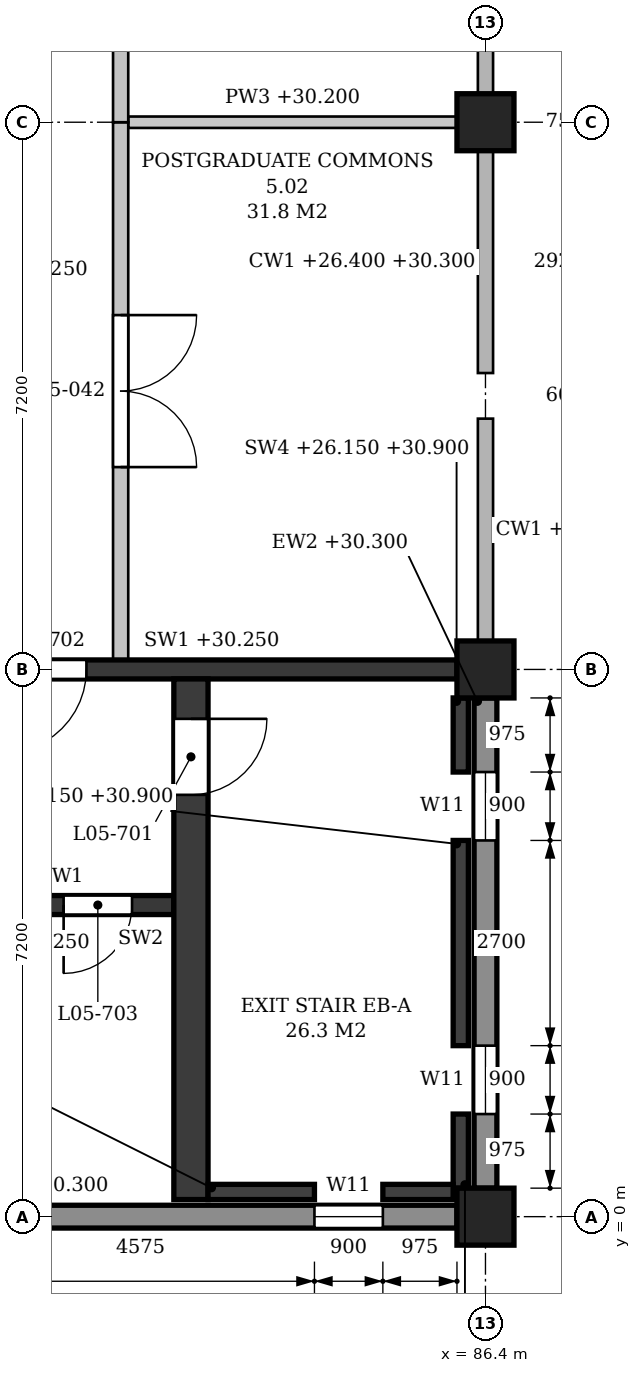
"""IFC4 building model, lengths in metres.
Left out: names, types, materials, properties, quantities, classifications, styles, units other than length and angle.
Written with IfcOpenShell. Run it as: python <this file> out.ifc"""

import sys

from ifc_helpers import new_model, si_unit, direction, frame, frame_2d, origin, origin_2d, place, context, subcontext, project, spatial, polyline, rectangle, outline, extrude, element, fill, save


model = new_model("IFC4")
c1 = context("Model", 3, precision=1e-05, world=origin(), true_north=direction((0.0, 1.0)))
c2 = subcontext(c1, "Body", "Model", "MODEL_VIEW")
j1 = project(units=[si_unit("LENGTHUNIT", "METRE"), si_unit("PLANEANGLEUNIT", "RADIAN")], contexts=[c1])
p1 = place(None, origin())
s1 = spatial("IfcSite", under=j1, at=p1, CompositionType="ELEMENT")
p2 = place(p1, origin())
s2 = spatial("IfcBuilding", under=s1, at=p2, CompositionType="ELEMENT")
p3 = place(p2, frame((0.0, 0.0, 26.4)))
s3 = spatial("IfcBuildingStorey", under=s2, at=p3, CompositionType="ELEMENT", Elevation=26.4)
for number, where, z_axis, x_axis in (
    (1, (86.4, 0.0, 0.0), (0.0, 0.0, 1.0), (1.0, 0.0, 0.0)),
    (2, (86.4, 7.2, 0.0), (0.0, 0.0, 1.0), (1.0, 0.0, 0.0)),
    (3, (86.4, 14.4, 0.0), (0.0, 0.0, 1.0), (1.0, 0.0, 0.0)),
):
    element("IfcColumn", number, at=place(p3, frame(where, z_axis=z_axis, x_axis=x_axis)), inside=s3, PredefinedType="COLUMN", context=c2, shape_type="SweptSolid", body=[
        extrude(rectangle(XDim=0.75, YDim=0.75, at=origin_2d()), origin(), (0.0, 0.0, 1.0), 4.8),
    ])
p4 = place(p3, frame((79.575, 0.0, 0.0), z_axis=(0.0, 0.0, 1.0), x_axis=(1.0, 0.0, 0.0)))
e4 = element("IfcWall", 4, at=p4, inside=s3, PredefinedType="STANDARD", context=c2, shape_type="SweptSolid", body=[
    extrude(rectangle(XDim=6.45, YDim=0.3, at=frame_2d((3.225, 0.0))), origin(), (0.0, 0.0, 1.0), 3.9),
])
p5 = place(p4, frame((4.575, 0.0, 0.9)))
e5 = element("IfcOpeningElement", 5, at=p5, cuts=e4, PredefinedType="OPENING", context=c2, shape_type="SweptSolid", body=[
    extrude(outline(polyline([(0.0, 0.0), (0.9, 0.0), (0.9, 2.05), (0.45, 2.5), (0.0, 2.05), (0.0, 0.0)])), frame((0.0, 0.16, 0.0), z_axis=(0.0, -1.0, 0.0), x_axis=(1.0, 0.0, 0.0)), (0.0, 0.0, 1.0), 0.32),
])
p6 = place(p3, frame((86.4, 0.375, 0.0), z_axis=(0.0, 0.0, 1.0), x_axis=(0.0, 1.0, 0.0)))
e6 = element("IfcWall", 6, at=p6, inside=s3, PredefinedType="STANDARD", context=c2, shape_type="SweptSolid", body=[
    extrude(rectangle(XDim=6.45, YDim=0.3, at=frame_2d((3.225, 0.0))), origin(), (0.0, 0.0, 1.0), 3.9),
])
p7 = place(p6, frame((0.975, 0.0, 0.9)))
e7 = element("IfcOpeningElement", 7, at=p7, cuts=e6, PredefinedType="OPENING", context=c2, shape_type="SweptSolid", body=[
    extrude(outline(polyline([(0.0, 0.0), (0.9, 0.0), (0.9, 2.05), (0.45, 2.5), (0.0, 2.05), (0.0, 0.0)])), frame((0.0, 0.16, 0.0), z_axis=(0.0, -1.0, 0.0), x_axis=(1.0, 0.0, 0.0)), (0.0, 0.0, 1.0), 0.32),
])
p8 = place(p6, frame((4.575, 0.0, 0.9)))
e8 = element("IfcOpeningElement", 8, at=p8, cuts=e6, PredefinedType="OPENING", context=c2, shape_type="SweptSolid", body=[
    extrude(outline(polyline([(0.0, 0.0), (0.9, 0.0), (0.9, 2.05), (0.45, 2.5), (0.0, 2.05), (0.0, 0.0)])), frame((0.0, 0.16, 0.0), z_axis=(0.0, -1.0, 0.0), x_axis=(1.0, 0.0, 0.0)), (0.0, 0.0, 1.0), 0.32),
])
p9 = place(p3, frame((79.575, 7.2, 0.0), z_axis=(0.0, 0.0, 1.0), x_axis=(1.0, 0.0, 0.0)))
e9 = element("IfcWall", 9, at=p9, inside=s3, PredefinedType="SHEAR", context=c2, shape_type="SweptSolid", body=[
    extrude(rectangle(XDim=6.45, YDim=0.25, at=frame_2d((3.225, 0.0))), origin(), (0.0, 0.0, 1.0), 3.85),
])
p10 = place(p9, frame((0.475, 0.0, 0.0)))
e10 = element("IfcOpeningElement", 10, at=p10, cuts=e9, PredefinedType="OPENING", context=c2, shape_type="SweptSolid", body=[
    extrude(rectangle(XDim=1.1, YDim=2.1, at=frame_2d((0.55, 1.05))), frame((0.0, 0.135, 0.0), z_axis=(0.0, -1.0, 0.0), x_axis=(1.0, 0.0, 0.0)), (0.0, 0.0, 1.0), 0.27),
])
p11 = place(p3, frame((86.075, 0.375, -0.25), z_axis=(0.0, 0.0, 1.0), x_axis=(0.0, 1.0, 0.0)))
e11 = element("IfcWall", 11, at=p11, inside=s3, PredefinedType="SHEAR", context=c2, shape_type="SweptSolid", body=[
    extrude(rectangle(XDim=0.975, YDim=0.2, at=frame_2d((0.488, 0.0))), origin(), (0.0, 0.0, 1.0), 4.75),
])
p12 = place(p3, frame((86.075, 2.25, -0.25), z_axis=(0.0, 0.0, 1.0), x_axis=(0.0, 1.0, 0.0)))
e12 = element("IfcWall", 12, at=p12, inside=s3, PredefinedType="SHEAR", context=c2, shape_type="SweptSolid", body=[
    extrude(rectangle(XDim=2.7, YDim=0.2, at=frame_2d((1.35, 0.0))), origin(), (0.0, 0.0, 1.0), 4.75),
])
p13 = place(p3, frame((86.075, 5.85, -0.25), z_axis=(0.0, 0.0, 1.0), x_axis=(0.0, 1.0, 0.0)))
e13 = element("IfcWall", 13, at=p13, inside=s3, PredefinedType="SHEAR", context=c2, shape_type="SweptSolid", body=[
    extrude(rectangle(XDim=0.975, YDim=0.2, at=frame_2d((0.487, 0.0))), origin(), (0.0, 0.0, 1.0), 4.75),
])
p14 = place(p3, frame((82.75, 0.325, -0.25), z_axis=(0.0, 0.0, 1.0), x_axis=(1.0, 0.0, 0.0)))
e14 = element("IfcWall", 14, at=p14, inside=s3, PredefinedType="SHEAR", context=c2, shape_type="SweptSolid", body=[
    extrude(rectangle(XDim=1.4, YDim=0.2, at=frame_2d((0.7, 0.0))), origin(), (0.0, 0.0, 1.0), 4.75),
])
p15 = place(p3, frame((85.05, 0.325, -0.25), z_axis=(0.0, 0.0, 1.0), x_axis=(1.0, 0.0, 0.0)))
e15 = element("IfcWall", 15, at=p15, inside=s3, PredefinedType="SHEAR", context=c2, shape_type="SweptSolid", body=[
    extrude(rectangle(XDim=0.925, YDim=0.2, at=frame_2d((0.462, 0.0))), origin(), (0.0, 0.0, 1.0), 4.75),
])
p16 = place(p3, frame((82.525, 0.225, 0.0), z_axis=(0.0, 0.0, 1.0), x_axis=(0.0, 1.0, 0.0)))
e16 = element("IfcWall", 16, at=p16, inside=s3, PredefinedType="SHEAR", context=c2, shape_type="SweptSolid", body=[
    extrude(rectangle(XDim=6.85, YDim=0.45, at=frame_2d((3.425, 0.0))), origin(), (0.0, 0.0, 1.0), 4.5),
])
p17 = place(p16, frame((5.325, 0.0, 0.0)))
e17 = element("IfcOpeningElement", 17, at=p17, cuts=e16, PredefinedType="OPENING", context=c2, shape_type="SweptSolid", body=[
    extrude(rectangle(XDim=1.0, YDim=2.1, at=frame_2d((0.5, 1.05))), frame((0.0, 0.235, 0.0), z_axis=(0.0, -1.0, 0.0), x_axis=(1.0, 0.0, 0.0)), (0.0, 0.0, 1.0), 0.47),
])
p18 = place(p3, frame((79.325, 4.1, 0.0), z_axis=(0.0, 0.0, 1.0), x_axis=(1.0, 0.0, 0.0)))
e18 = element("IfcWall", 18, at=p18, inside=s3, PredefinedType="SHEAR", context=c2, shape_type="SweptSolid", body=[
    extrude(rectangle(XDim=2.975, YDim=0.25, at=frame_2d((1.488, 0.0))), origin(), (0.0, 0.0, 1.0), 4.5),
])
p19 = place(p18, frame((1.525, 0.0, 0.0)))
e19 = element("IfcOpeningElement", 19, at=p19, cuts=e18, PredefinedType="OPENING", context=c2, shape_type="SweptSolid", body=[
    extrude(rectangle(XDim=0.9, YDim=2.1, at=frame_2d((0.45, 1.05))), frame((0.0, 0.135, 0.0), z_axis=(0.0, -1.0, 0.0), x_axis=(1.0, 0.0, 0.0)), (0.0, 0.0, 1.0), 0.27),
])
p20 = place(p3, frame((81.7, 14.4, 0.0), z_axis=(0.0, 0.0, 1.0), x_axis=(1.0, 0.0, 0.0)))
e20 = element("IfcWall", 20, at=p20, inside=s3, PredefinedType="PARTITIONING", context=c2, shape_type="SweptSolid", body=[
    extrude(rectangle(XDim=4.325, YDim=0.15, at=frame_2d((2.163, 0.0))), origin(), (0.0, 0.0, 1.0), 3.8),
])
p21 = place(p3, frame((81.6, 7.325, 0.0), z_axis=(0.0, 0.0, 1.0), x_axis=(0.0, 1.0, 0.0)))
e21 = element("IfcWall", 21, at=p21, inside=s3, PredefinedType="PARTITIONING", context=c2, shape_type="SweptSolid", body=[
    extrude(outline(polyline([(0.0, 0.0), (7.075, 0.0), (7.075, 3.85), (6.85, 3.85), (6.85, 4.5), (0.1, 4.5), (0.1, 3.85), (0.0, 3.85), (0.0, 0.0)])), frame((0.0, 0.1, 0.0), z_axis=(0.0, -1.0, 0.0), x_axis=(1.0, 0.0, 0.0)), (0.0, 0.0, 1.0), 0.2),
])
p22 = place(p21, frame((2.537, 0.0, 0.0)))
e22 = element("IfcOpeningElement", 22, at=p22, cuts=e21, PredefinedType="OPENING", context=c2, shape_type="SweptSolid", body=[
    extrude(rectangle(XDim=2.0, YDim=2.1, at=frame_2d((1.0, 1.05))), frame((0.0, 0.11, 0.0), z_axis=(0.0, -1.0, 0.0), x_axis=(1.0, 0.0, 0.0)), (0.0, 0.0, 1.0), 0.22),
])
p23 = place(p3, frame((81.6, 14.4, 0.0), z_axis=(0.0, 0.0, 1.0), x_axis=(0.0, 1.0, 0.0)))
e23 = element("IfcWall", 23, at=p23, inside=s3, PredefinedType="PARTITIONING", context=c2, shape_type="SweptSolid", body=[
    extrude(outline(polyline([(0.0, 0.0), (7.2, 0.0), (7.2, 3.85), (6.975, 3.85), (6.975, 4.5), (0.225, 4.5), (0.225, 3.85), (0.0, 3.85), (0.0, 0.0)])), frame((0.0, 0.1, 0.0), z_axis=(0.0, -1.0, 0.0), x_axis=(1.0, 0.0, 0.0)), (0.0, 0.0, 1.0), 0.2),
])
p24 = place(p23, frame((3.1, 0.0, 0.0)))
e24 = element("IfcOpeningElement", 24, at=p24, cuts=e23, PredefinedType="OPENING", context=c2, shape_type="SweptSolid", body=[
    extrude(rectangle(XDim=1.0, YDim=2.1, at=frame_2d((0.5, 1.05))), frame((0.0, 0.11, 0.0), z_axis=(0.0, -1.0, 0.0), x_axis=(1.0, 0.0, 0.0)), (0.0, 0.0, 1.0), 0.22),
])
p25 = place(p7, origin())
e25 = element("IfcWindow", 25, at=p25, inside=s3, PartitioningType="SINGLE_PANEL", PredefinedType="WINDOW", context=c2, shape_type="SweptSolid", body=[
    extrude(outline(polyline([(0.0, 0.0), (0.9, 0.0), (0.9, 2.05), (0.45, 2.5), (0.0, 2.05), (0.0, 0.0)])), frame((0.0, 0.03, 0.0), z_axis=(0.0, -1.0, 0.0), x_axis=(1.0, 0.0, 0.0)), (0.0, 0.0, 1.0), 0.06),
])
fill(e7, e25)
p26 = place(p8, origin())
e26 = element("IfcWindow", 26, at=p26, inside=s3, PartitioningType="SINGLE_PANEL", PredefinedType="WINDOW", context=c2, shape_type="SweptSolid", body=[
    extrude(outline(polyline([(0.0, 0.0), (0.9, 0.0), (0.9, 2.05), (0.45, 2.5), (0.0, 2.05), (0.0, 0.0)])), frame((0.0, 0.03, 0.0), z_axis=(0.0, -1.0, 0.0), x_axis=(1.0, 0.0, 0.0)), (0.0, 0.0, 1.0), 0.06),
])
fill(e8, e26)
p27 = place(p5, origin())
e27 = element("IfcWindow", 27, at=p27, inside=s3, PartitioningType="SINGLE_PANEL", PredefinedType="WINDOW", context=c2, shape_type="SweptSolid", body=[
    extrude(outline(polyline([(0.0, 0.0), (0.9, 0.0), (0.9, 2.05), (0.45, 2.5), (0.0, 2.05), (0.0, 0.0)])), frame((0.0, 0.03, 0.0), z_axis=(0.0, -1.0, 0.0), x_axis=(1.0, 0.0, 0.0)), (0.0, 0.0, 1.0), 0.06),
])
fill(e5, e27)
p28 = place(p17, frame((1.0, 0.0, 0.0), z_axis=(0.0, 0.0, 1.0), x_axis=(-1.0, 0.0, 0.0)))
e28 = element("IfcDoor", 28, at=p28, inside=s3, OperationType="SINGLE_SWING_LEFT", PredefinedType="DOOR", context=c2, shape_type="SweptSolid", body=[
    extrude(rectangle(XDim=1.0, YDim=2.1, at=frame_2d((0.5, 1.05))), frame((0.0, 0.025, 0.0), z_axis=(0.0, -1.0, 0.0), x_axis=(1.0, 0.0, 0.0)), (0.0, 0.0, 1.0), 0.05),
])
fill(e17, e28)
p29 = place(p10, frame((1.1, 0.0, 0.0), z_axis=(0.0, 0.0, 1.0), x_axis=(-1.0, 0.0, 0.0)))
e29 = element("IfcDoor", 29, at=p29, inside=s3, OperationType="SINGLE_SWING_RIGHT", PredefinedType="DOOR", context=c2, shape_type="SweptSolid", body=[
    extrude(rectangle(XDim=1.1, YDim=2.1, at=frame_2d((0.55, 1.05))), frame((0.0, 0.025, 0.0), z_axis=(0.0, -1.0, 0.0), x_axis=(1.0, 0.0, 0.0)), (0.0, 0.0, 1.0), 0.05),
])
fill(e10, e29)
p30 = place(p19, frame((0.9, 0.0, 0.0), z_axis=(0.0, 0.0, 1.0), x_axis=(-1.0, 0.0, 0.0)))
e30 = element("IfcDoor", 30, at=p30, inside=s3, OperationType="SINGLE_SWING_RIGHT", PredefinedType="DOOR", context=c2, shape_type="SweptSolid", body=[
    extrude(rectangle(XDim=0.9, YDim=2.1, at=frame_2d((0.45, 1.05))), frame((0.0, 0.025, 0.0), z_axis=(0.0, -1.0, 0.0), x_axis=(1.0, 0.0, 0.0)), (0.0, 0.0, 1.0), 0.05),
])
fill(e19, e30)
p31 = place(p22, origin())
e31 = element("IfcDoor", 31, at=p31, inside=s3, OperationType="DOUBLE_DOOR_SINGLE_SWING", PredefinedType="DOOR", context=c2, shape_type="SweptSolid", body=[
    extrude(rectangle(XDim=2.0, YDim=2.1, at=frame_2d((1.0, 1.05))), frame((0.0, 0.025, 0.0), z_axis=(0.0, -1.0, 0.0), x_axis=(1.0, 0.0, 0.0)), (0.0, 0.0, 1.0), 0.05),
])
fill(e22, e31)
save(model, sys.argv[1])
